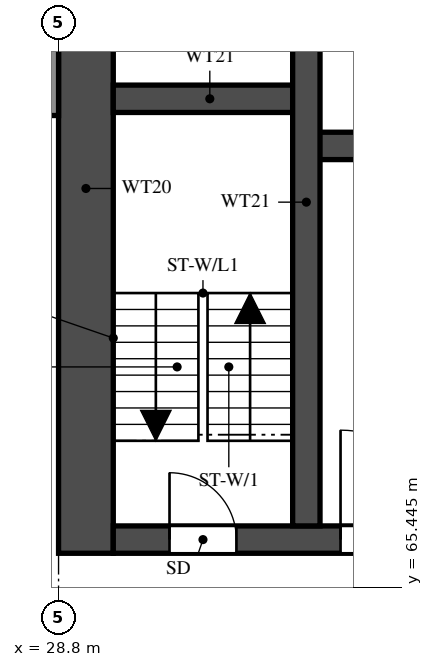
"""IFC4 building model, lengths in metres.
Left out: names, types, materials, properties, quantities, classifications, styles, units other than length and angle.
Written with IfcOpenShell. Run it as: python <this file> out.ifc"""

import sys

from ifc_helpers import new_model, si_unit, direction, frame, frame_2d, origin, place, context, subcontext, project, spatial, rectangle, extrude, element, fill, save


model = new_model("IFC4")
c1 = context("Model", 3, precision=1e-05, world=origin(), true_north=direction((0.0, 1.0)))
c2 = subcontext(c1, "Body", "Model", "MODEL_VIEW")
j1 = project(units=[si_unit("LENGTHUNIT", "METRE"), si_unit("PLANEANGLEUNIT", "RADIAN")], contexts=[c1])
p1 = place(None, origin())
s1 = spatial("IfcSite", under=j1, at=p1, CompositionType="ELEMENT")
p2 = place(p1, origin())
s2 = spatial("IfcBuilding", under=s1, at=p2, CompositionType="ELEMENT")
p3 = place(p2, frame((0.0, 0.0, 65.5)))
s3 = spatial("IfcBuildingStorey", under=s2, at=p3, CompositionType="ELEMENT", Elevation=65.5)
p4 = place(p3, frame((29.25, 66.0, 0.0), z_axis=(0.0, 0.0, 1.0), x_axis=(0.0, 1.0, 0.0)))
e1 = element("IfcWall", 1, at=p4, inside=s3, PredefinedType="SHEAR", context=c2, shape_type="SweptSolid", body=[
    extrude(rectangle(XDim=12.0, YDim=0.9, at=frame_2d((6.0, 0.0))), origin(), (0.0, 0.0, 1.0), 3.18),
])
p5 = place(p3, frame((29.7, 66.225, 0.0), z_axis=(0.0, 0.0, 1.0), x_axis=(1.0, 0.0, 0.0)))
e2 = element("IfcWall", 2, at=p5, inside=s3, PredefinedType="SHEAR", context=c2, shape_type="SweptSolid", body=[
    extrude(rectangle(XDim=41.4, YDim=0.45, at=frame_2d((20.7, 0.0))), origin(), (0.0, 0.0, 1.0), 3.18),
])
p6 = place(p5, frame((0.925, 0.0, 0.0)))
e3 = element("IfcOpeningElement", 3, at=p6, cuts=e2, PredefinedType="OPENING", context=c2, shape_type="SweptSolid", body=[
    extrude(rectangle(XDim=1.1, YDim=2.1, at=frame_2d((0.55, 1.05))), frame((0.0, 0.235, 0.0), z_axis=(0.0, -1.0, 0.0), x_axis=(1.0, 0.0, 0.0)), (0.0, 0.0, 1.0), 0.47),
])
p7 = place(p5, frame((3.738, 0.0, 0.0)))
e4 = element("IfcOpeningElement", 4, at=p7, cuts=e2, PredefinedType="OPENING", context=c2, shape_type="SweptSolid", body=[
    extrude(rectangle(XDim=1.8, YDim=2.1, at=frame_2d((0.9, 1.05))), frame((0.0, 0.235, 0.0), z_axis=(0.0, -1.0, 0.0), x_axis=(1.0, 0.0, 0.0)), (0.0, 0.0, 1.0), 0.47),
])
p8 = place(p3, frame((32.875, 72.7, 0.0), z_axis=(0.0, 0.0, 1.0), x_axis=(1.0, 0.0, 0.0)))
e5 = element("IfcWall", 5, at=p8, inside=s3, PredefinedType="SHEAR", context=c2, shape_type="SweptSolid", body=[
    extrude(rectangle(XDim=35.05, YDim=0.45, at=frame_2d((17.525, 0.0))), origin(), (0.0, 0.0, 1.0), 3.18),
])
p9 = place(p8, frame((19.8, 0.0, 0.0)))
e6 = element("IfcOpeningElement", 6, at=p9, cuts=e5, PredefinedType="OPENING", context=c2, shape_type="SweptSolid", body=[
    extrude(rectangle(XDim=1.1, YDim=2.1, at=frame_2d((0.55, 1.05))), frame((0.0, 0.235, 0.0), z_axis=(0.0, -1.0, 0.0), x_axis=(1.0, 0.0, 0.0)), (0.0, 0.0, 1.0), 0.47),
])
p10 = place(p8, frame((27.65, 0.0, 0.0)))
e7 = element("IfcOpeningElement", 7, at=p10, cuts=e5, PredefinedType="OPENING", context=c2, shape_type="SweptSolid", body=[
    extrude(rectangle(XDim=1.1, YDim=2.1, at=frame_2d((0.55, 1.05))), frame((0.0, 0.235, 0.0), z_axis=(0.0, -1.0, 0.0), x_axis=(1.0, 0.0, 0.0)), (0.0, 0.0, 1.0), 0.47),
])
p11 = place(p8, frame((30.25, 0.0, 0.0)))
e8 = element("IfcOpeningElement", 8, at=p11, cuts=e5, PredefinedType="OPENING", context=c2, shape_type="SweptSolid", body=[
    extrude(rectangle(XDim=1.1, YDim=2.1, at=frame_2d((0.55, 1.05))), frame((0.0, 0.235, 0.0), z_axis=(0.0, -1.0, 0.0), x_axis=(1.0, 0.0, 0.0)), (0.0, 0.0, 1.0), 0.47),
])
p12 = place(p8, frame((3.75, 0.0, 0.0)))
e9 = element("IfcOpeningElement", 9, at=p12, cuts=e5, PredefinedType="OPENING", context=c2, shape_type="SweptSolid", body=[
    extrude(rectangle(XDim=1.1, YDim=2.1, at=frame_2d((0.55, 1.05))), frame((0.0, 0.235, 0.0), z_axis=(0.0, -1.0, 0.0), x_axis=(1.0, 0.0, 0.0)), (0.0, 0.0, 1.0), 0.47),
])
p13 = place(p8, frame((6.5, 0.0, 0.0)))
e10 = element("IfcOpeningElement", 10, at=p13, cuts=e5, PredefinedType="OPENING", context=c2, shape_type="SweptSolid", body=[
    extrude(rectangle(XDim=1.1, YDim=2.1, at=frame_2d((0.55, 1.05))), frame((0.0, 0.235, 0.0), z_axis=(0.0, -1.0, 0.0), x_axis=(1.0, 0.0, 0.0)), (0.0, 0.0, 1.0), 0.47),
])
p14 = place(p8, frame((9.25, 0.0, 0.0)))
e11 = element("IfcOpeningElement", 11, at=p14, cuts=e5, PredefinedType="OPENING", context=c2, shape_type="SweptSolid", body=[
    extrude(rectangle(XDim=1.1, YDim=2.1, at=frame_2d((0.55, 1.05))), frame((0.0, 0.235, 0.0), z_axis=(0.0, -1.0, 0.0), x_axis=(1.0, 0.0, 0.0)), (0.0, 0.0, 1.0), 0.47),
])
p15 = place(p8, frame((12.0, 0.0, 0.0)))
e12 = element("IfcOpeningElement", 12, at=p15, cuts=e5, PredefinedType="OPENING", context=c2, shape_type="SweptSolid", body=[
    extrude(rectangle(XDim=1.1, YDim=2.1, at=frame_2d((0.55, 1.05))), frame((0.0, 0.235, 0.0), z_axis=(0.0, -1.0, 0.0), x_axis=(1.0, 0.0, 0.0)), (0.0, 0.0, 1.0), 0.47),
])
p16 = place(p8, frame((14.75, 0.0, 0.0)))
e13 = element("IfcOpeningElement", 13, at=p16, cuts=e5, PredefinedType="OPENING", context=c2, shape_type="SweptSolid", body=[
    extrude(rectangle(XDim=1.1, YDim=2.1, at=frame_2d((0.55, 1.05))), frame((0.0, 0.235, 0.0), z_axis=(0.0, -1.0, 0.0), x_axis=(1.0, 0.0, 0.0)), (0.0, 0.0, 1.0), 0.47),
])
p17 = place(p8, frame((17.5, 0.0, 0.0)))
e14 = element("IfcOpeningElement", 14, at=p17, cuts=e5, PredefinedType="OPENING", context=c2, shape_type="SweptSolid", body=[
    extrude(rectangle(XDim=1.1, YDim=2.1, at=frame_2d((0.55, 1.05))), frame((0.0, 0.235, 0.0), z_axis=(0.0, -1.0, 0.0), x_axis=(1.0, 0.0, 0.0)), (0.0, 0.0, 1.0), 0.47),
])
p18 = place(p8, frame((0.913, 0.0, 0.0)))
e15 = element("IfcOpeningElement", 15, at=p18, cuts=e5, PredefinedType="OPENING", context=c2, shape_type="SweptSolid", body=[
    extrude(rectangle(XDim=1.1, YDim=2.1, at=frame_2d((0.55, 1.05))), frame((0.0, 0.235, 0.0), z_axis=(0.0, -1.0, 0.0), x_axis=(1.0, 0.0, 0.0)), (0.0, 0.0, 1.0), 0.47),
])
p19 = place(p3, frame((29.7, 73.475, 0.0), z_axis=(0.0, 0.0, 1.0), x_axis=(1.0, 0.0, 0.0)))
e16 = element("IfcWall", 16, at=p19, inside=s3, PredefinedType="SHEAR", context=c2, shape_type="SweptSolid", body=[
    extrude(rectangle(XDim=3.175, YDim=0.45, at=frame_2d((1.587, 0.0))), origin(), (0.0, 0.0, 1.0), 3.18),
])
p20 = place(p3, frame((32.875, 66.45, 0.0), z_axis=(0.0, 0.0, 1.0), x_axis=(0.0, 1.0, 0.0)))
e17 = element("IfcWall", 17, at=p20, inside=s3, PredefinedType="SHEAR", context=c2, shape_type="SweptSolid", body=[
    extrude(rectangle(XDim=10.65, YDim=0.45, at=frame_2d((5.325, 0.0))), origin(), (0.0, 0.0, 1.0), 3.18),
])
p21 = place(p3, frame((28.7, 73.2, 0.0), z_axis=(0.0, 0.0, 1.0), x_axis=(0.0, 1.0, 0.0)))
e18 = element("IfcWall", 18, at=p21, inside=s3, PredefinedType="SOLIDWALL", context=c2, shape_type="SweptSolid", body=[
    extrude(rectangle(XDim=4.8, YDim=0.2, at=frame_2d((2.4, 0.0))), origin(), (0.0, 0.0, 1.0), 3.18),
])
p22 = place(p6, origin())
e19 = element("IfcDoor", 19, at=p22, inside=s3, OperationType="SINGLE_SWING_LEFT", PredefinedType="DOOR", context=c2, shape_type="SweptSolid", body=[
    extrude(rectangle(XDim=1.1, YDim=2.1, at=frame_2d((0.55, 1.05))), frame((0.0, 0.025, 0.0), z_axis=(0.0, -1.0, 0.0), x_axis=(1.0, 0.0, 0.0)), (0.0, 0.0, 1.0), 0.05),
])
fill(e3, e19)
p23 = place(p7, origin())
e20 = element("IfcDoor", 20, at=p23, inside=s3, OperationType="DOUBLE_DOOR_SINGLE_SWING", PredefinedType="DOOR", context=c2, shape_type="SweptSolid", body=[
    extrude(rectangle(XDim=1.8, YDim=2.1, at=frame_2d((0.9, 1.05))), frame((0.0, 0.025, 0.0), z_axis=(0.0, -1.0, 0.0), x_axis=(1.0, 0.0, 0.0)), (0.0, 0.0, 1.0), 0.05),
])
fill(e4, e20)
save(model, sys.argv[1])
